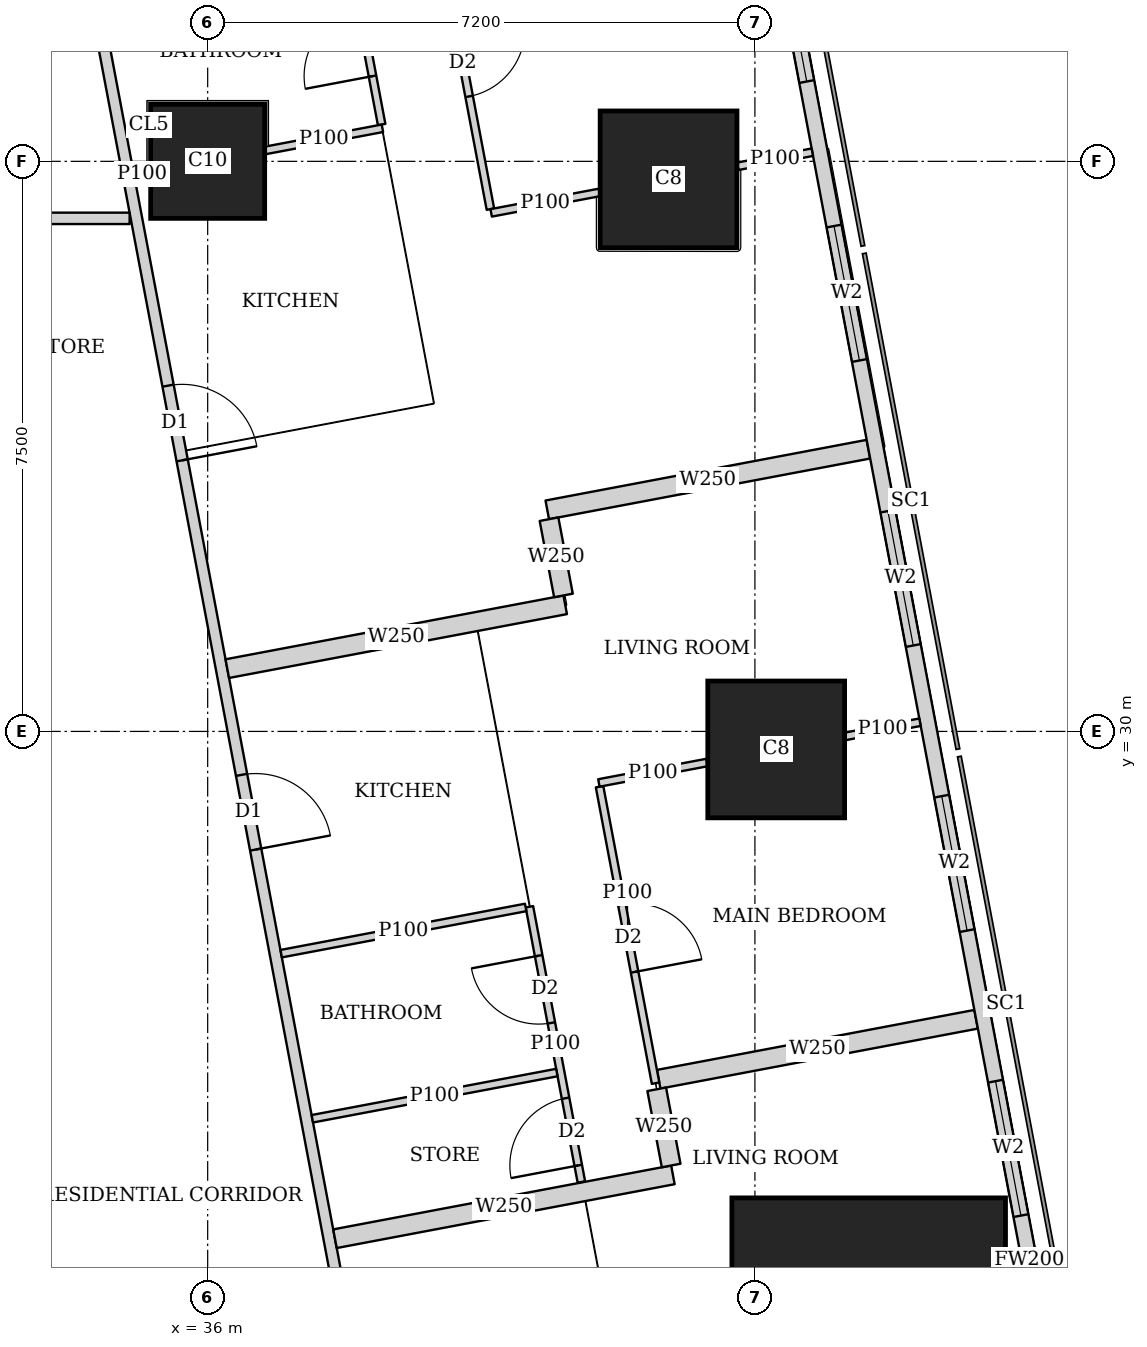
"""IFC4 building model, lengths in metres.
Left out: names, types, materials, properties, quantities, classifications, styles, units other than length and angle.
Written with IfcOpenShell. Run it as: python <this file> out.ifc"""

import sys

from ifc_helpers import new_model, si_unit, direction, frame, frame_2d, origin, origin_2d, place, context, subcontext, project, spatial, rectangle, extrude, element, fill, save


model = new_model("IFC4")
c1 = context("Model", 3, precision=1e-05, world=origin(), true_north=direction((0.0, 1.0)))
c2 = subcontext(c1, "Body", "Model", "MODEL_VIEW")
j1 = project(units=[si_unit("LENGTHUNIT", "METRE"), si_unit("PLANEANGLEUNIT", "RADIAN")], contexts=[c1])
p1 = place(None, origin())
s1 = spatial("IfcSite", under=j1, at=p1, CompositionType="ELEMENT")
p2 = place(p1, origin())
s2 = spatial("IfcBuilding", under=s1, at=p2, CompositionType="ELEMENT")
p3 = place(p2, frame((0.0, 0.0, 169.55)))
s3 = spatial("IfcBuildingStorey", under=s2, at=p3, CompositionType="ELEMENT", Elevation=169.55)
p4 = place(p3, frame((44.697, 22.263, 0.0), z_axis=(0.0, 0.0, 1.0), x_axis=(1.0, 0.0, 0.0)))
e1 = element("IfcColumn", 1, at=p4, inside=s3, PredefinedType="COLUMN", context=c2, shape_type="SweptSolid", body=[
    extrude(rectangle(XDim=3.6, YDim=3.2, at=origin_2d()), origin(), (0.0, 0.0, 1.0), 3.75),
])
p5 = place(p3, frame((43.48, 29.763, 0.0), z_axis=(0.0, 0.0, 1.0), x_axis=(1.0, 0.0, 0.0)))
e2 = element("IfcColumn", 2, at=p5, inside=s3, PredefinedType="COLUMN", context=c2, shape_type="SweptSolid", body=[
    extrude(rectangle(XDim=1.8, YDim=1.8, at=origin_2d()), origin(), (0.0, 0.0, 1.0), 3.75),
])
p6 = place(p3, frame((36.0, 37.5, 0.0), z_axis=(0.0, 0.0, 1.0), x_axis=(1.0, 0.0, 0.0)))
e3 = element("IfcColumn", 3, at=p6, inside=s3, PredefinedType="COLUMN", context=c2, shape_type="SweptSolid", body=[
    extrude(rectangle(XDim=1.5, YDim=1.5, at=origin_2d()), origin(), (0.0, 0.0, 1.0), 3.75),
])
p7 = place(p3, frame((42.064, 37.263, 0.0), z_axis=(0.0, 0.0, 1.0), x_axis=(1.0, 0.0, 0.0)))
e4 = element("IfcColumn", 4, at=p7, inside=s3, PredefinedType="COLUMN", context=c2, shape_type="SweptSolid", body=[
    extrude(rectangle(XDim=1.8, YDim=1.8, at=origin_2d()), origin(), (0.0, 0.0, 1.0), 3.75),
])
p8 = place(p3, frame((50.653, 2.703, 0.0), z_axis=(0.0, 0.0, 1.0), x_axis=(-0.185612026696, 0.982623109613, 0.0)))
e5 = element("IfcWall", 5, at=p8, inside=s3, PredefinedType="SOLIDWALL", context=c2, shape_type="SweptSolid", body=[
    extrude(rectangle(XDim=41.393, YDim=0.2, at=frame_2d((20.697, 0.0))), origin(), (0.0, 0.0, 1.0), 3.5),
])
p9 = place(p8, frame((1.633, 0.0, 0.9)))
e6 = element("IfcOpeningElement", 6, at=p9, cuts=e5, PredefinedType="OPENING", context=c2, shape_type="SweptSolid", body=[
    extrude(rectangle(XDim=1.8, YDim=1.5, at=frame_2d((0.9, 0.75))), frame((0.0, 0.11, 0.0), z_axis=(0.0, -1.0, 0.0), x_axis=(1.0, 0.0, 0.0)), (0.0, 0.0, 1.0), 0.22),
])
p10 = place(p8, frame((6.032, 0.0, 0.9)))
e7 = element("IfcOpeningElement", 7, at=p10, cuts=e5, PredefinedType="OPENING", context=c2, shape_type="SweptSolid", body=[
    extrude(rectangle(XDim=1.8, YDim=1.5, at=frame_2d((0.9, 0.75))), frame((0.0, 0.11, 0.0), z_axis=(0.0, -1.0, 0.0), x_axis=(1.0, 0.0, 0.0)), (0.0, 0.0, 1.0), 0.22),
])
p11 = place(p8, frame((9.848, 0.0, 0.9)))
e8 = element("IfcOpeningElement", 8, at=p11, cuts=e5, PredefinedType="OPENING", context=c2, shape_type="SweptSolid", body=[
    extrude(rectangle(XDim=1.8, YDim=1.5, at=frame_2d((0.9, 0.75))), frame((0.0, 0.11, 0.0), z_axis=(0.0, -1.0, 0.0), x_axis=(1.0, 0.0, 0.0)), (0.0, 0.0, 1.0), 0.22),
])
p12 = place(p8, frame((13.664, 0.0, 0.9)))
e9 = element("IfcOpeningElement", 9, at=p12, cuts=e5, PredefinedType="OPENING", context=c2, shape_type="SweptSolid", body=[
    extrude(rectangle(XDim=1.8, YDim=1.5, at=frame_2d((0.9, 0.75))), frame((0.0, 0.11, 0.0), z_axis=(0.0, -1.0, 0.0), x_axis=(1.0, 0.0, 0.0)), (0.0, 0.0, 1.0), 0.22),
])
p13 = place(p8, frame((17.481, 0.0, 0.9)))
e10 = element("IfcOpeningElement", 10, at=p13, cuts=e5, PredefinedType="OPENING", context=c2, shape_type="SweptSolid", body=[
    extrude(rectangle(XDim=1.8, YDim=1.5, at=frame_2d((0.9, 0.75))), frame((0.0, 0.11, 0.0), z_axis=(0.0, -1.0, 0.0), x_axis=(1.0, 0.0, 0.0)), (0.0, 0.0, 1.0), 0.22),
])
p14 = place(p8, frame((21.297, 0.0, 0.9)))
e11 = element("IfcOpeningElement", 11, at=p14, cuts=e5, PredefinedType="OPENING", context=c2, shape_type="SweptSolid", body=[
    extrude(rectangle(XDim=1.8, YDim=1.5, at=frame_2d((0.9, 0.75))), frame((0.0, 0.11, 0.0), z_axis=(0.0, -1.0, 0.0), x_axis=(1.0, 0.0, 0.0)), (0.0, 0.0, 1.0), 0.22),
])
p15 = place(p8, frame((25.113, 0.0, 0.9)))
e12 = element("IfcOpeningElement", 12, at=p15, cuts=e5, PredefinedType="OPENING", context=c2, shape_type="SweptSolid", body=[
    extrude(rectangle(XDim=1.8, YDim=1.5, at=frame_2d((0.9, 0.75))), frame((0.0, 0.11, 0.0), z_axis=(0.0, -1.0, 0.0), x_axis=(1.0, 0.0, 0.0)), (0.0, 0.0, 1.0), 0.22),
])
p16 = place(p8, frame((28.93, 0.0, 0.9)))
e13 = element("IfcOpeningElement", 13, at=p16, cuts=e5, PredefinedType="OPENING", context=c2, shape_type="SweptSolid", body=[
    extrude(rectangle(XDim=1.8, YDim=1.5, at=frame_2d((0.9, 0.75))), frame((0.0, 0.11, 0.0), z_axis=(0.0, -1.0, 0.0), x_axis=(1.0, 0.0, 0.0)), (0.0, 0.0, 1.0), 0.22),
])
p17 = place(p8, frame((32.746, 0.0, 0.9)))
e14 = element("IfcOpeningElement", 14, at=p17, cuts=e5, PredefinedType="OPENING", context=c2, shape_type="SweptSolid", body=[
    extrude(rectangle(XDim=1.8, YDim=1.5, at=frame_2d((0.9, 0.75))), frame((0.0, 0.11, 0.0), z_axis=(0.0, -1.0, 0.0), x_axis=(1.0, 0.0, 0.0)), (0.0, 0.0, 1.0), 0.22),
])
p18 = place(p8, frame((36.481, 0.0, 0.9)))
e15 = element("IfcOpeningElement", 15, at=p18, cuts=e5, PredefinedType="OPENING", context=c2, shape_type="SweptSolid", body=[
    extrude(rectangle(XDim=1.8, YDim=1.5, at=frame_2d((0.9, 0.75))), frame((0.0, 0.11, 0.0), z_axis=(0.0, -1.0, 0.0), x_axis=(1.0, 0.0, 0.0)), (0.0, 0.0, 1.0), 0.22),
])
p19 = place(p3, frame((29.551, 36.75, 0.0), z_axis=(0.0, 0.0, 1.0), x_axis=(1.0, 0.0, 0.0)))
e16 = element("IfcWall", 16, at=p19, inside=s3, PredefinedType="SOLIDWALL", context=c2, shape_type="SweptSolid", body=[
    extrude(rectangle(XDim=5.422, YDim=0.15, at=frame_2d((2.711, 0.0))), origin(), (0.0, 0.0, 1.0), 3.5),
])
p20 = place(p19, frame((2.895, 0.0, 0.0)))
e17 = element("IfcOpeningElement", 17, at=p20, cuts=e16, PredefinedType="OPENING", context=c2, shape_type="SweptSolid", body=[
    extrude(rectangle(XDim=1.0, YDim=2.1, at=frame_2d((0.5, 1.05))), frame((0.0, 0.085, 0.0), z_axis=(0.0, -1.0, 0.0), x_axis=(1.0, 0.0, 0.0)), (0.0, 0.0, 1.0), 0.17),
])
p21 = place(p3, frame((33.877, 43.029, 0.0), z_axis=(0.0, 0.0, 1.0), x_axis=(0.185596841028, -0.98262597798, 0.0)))
e18 = element("IfcWall", 18, at=p21, inside=s3, PredefinedType="SOLIDWALL", context=c2, shape_type="SweptSolid", body=[
    extrude(rectangle(XDim=41.66, YDim=0.15, at=frame_2d((20.83, 0.0))), origin(), (0.0, 0.0, 1.0), 2.5),
])
p22 = place(p21, frame((8.63, 0.0, 0.0)))
e19 = element("IfcOpeningElement", 19, at=p22, cuts=e18, PredefinedType="OPENING", context=c2, shape_type="SweptSolid", body=[
    extrude(rectangle(XDim=1.0, YDim=2.1, at=frame_2d((0.5, 1.05))), frame((0.0, 0.085, 0.0), z_axis=(0.0, -1.0, 0.0), x_axis=(1.0, 0.0, 0.0)), (0.0, 0.0, 1.0), 0.17),
])
p23 = place(p21, frame((13.841, 0.0, 0.0)))
e20 = element("IfcOpeningElement", 20, at=p23, cuts=e18, PredefinedType="OPENING", context=c2, shape_type="SweptSolid", body=[
    extrude(rectangle(XDim=1.0, YDim=2.1, at=frame_2d((0.5, 1.05))), frame((0.0, 0.085, 0.0), z_axis=(0.0, -1.0, 0.0), x_axis=(1.0, 0.0, 0.0)), (0.0, 0.0, 1.0), 0.17),
])
p24 = place(p21, frame((21.474, 0.0, 0.0)))
e21 = element("IfcOpeningElement", 21, at=p24, cuts=e18, PredefinedType="OPENING", context=c2, shape_type="SweptSolid", body=[
    extrude(rectangle(XDim=1.0, YDim=2.1, at=frame_2d((0.5, 1.05))), frame((0.0, 0.085, 0.0), z_axis=(0.0, -1.0, 0.0), x_axis=(1.0, 0.0, 0.0)), (0.0, 0.0, 1.0), 0.17),
])
p25 = place(p21, frame((30.4, 0.0, 0.0)))
e22 = element("IfcOpeningElement", 22, at=p25, cuts=e18, PredefinedType="OPENING", context=c2, shape_type="SweptSolid", body=[
    extrude(rectangle(XDim=1.0, YDim=2.1, at=frame_2d((0.5, 1.05))), frame((0.0, 0.085, 0.0), z_axis=(0.0, -1.0, 0.0), x_axis=(1.0, 0.0, 0.0)), (0.0, 0.0, 1.0), 0.17),
])
p26 = place(p21, frame((32.288, 0.0, 0.0)))
e23 = element("IfcOpeningElement", 23, at=p26, cuts=e18, PredefinedType="OPENING", context=c2, shape_type="SweptSolid", body=[
    extrude(rectangle(XDim=1.0, YDim=2.1, at=frame_2d((0.5, 1.05))), frame((0.0, 0.085, 0.0), z_axis=(0.0, -1.0, 0.0), x_axis=(1.0, 0.0, 0.0)), (0.0, 0.0, 1.0), 0.17),
])
p27 = place(p3, frame((38.701, 42.27, 0.0), z_axis=(0.0, 0.0, 1.0), x_axis=(0.185474244877, -0.982649125826, 0.0)))
e24 = element("IfcWall", 24, at=p27, inside=s3, PredefinedType="PARTITIONING", context=c2, shape_type="SweptSolid", body=[
    extrude(rectangle(XDim=5.494, YDim=0.1, at=frame_2d((2.747, 0.0))), origin(), (0.0, 0.0, 1.0), 3.5),
])
p28 = place(p27, frame((3.085, 0.0, 0.0)))
e25 = element("IfcOpeningElement", 25, at=p28, cuts=e24, PredefinedType="OPENING", context=c2, shape_type="SweptSolid", body=[
    extrude(rectangle(XDim=0.9, YDim=2.1, at=frame_2d((0.45, 1.05))), frame((0.0, 0.06, 0.0), z_axis=(0.0, -1.0, 0.0), x_axis=(1.0, 0.0, 0.0)), (0.0, 0.0, 1.0), 0.12),
])
p29 = place(p3, frame((37.41, 42.639, 0.0), z_axis=(0.0, 0.0, 1.0), x_axis=(0.185579683022, -0.982629218601, 0.0)))
e26 = element("IfcWall", 26, at=p29, inside=s3, PredefinedType="PARTITIONING", context=c2, shape_type="SweptSolid", body=[
    extrude(rectangle(XDim=4.737, YDim=0.1, at=frame_2d((2.369, 0.0))), origin(), (0.0, 0.0, 1.0), 3.5),
])
p30 = place(p29, frame((3.189, 0.0, 0.0)))
e27 = element("IfcOpeningElement", 27, at=p30, cuts=e26, PredefinedType="OPENING", context=c2, shape_type="SweptSolid", body=[
    extrude(rectangle(XDim=0.9, YDim=2.1, at=frame_2d((0.45, 1.05))), frame((0.0, 0.06, 0.0), z_axis=(0.0, -1.0, 0.0), x_axis=(1.0, 0.0, 0.0)), (0.0, 0.0, 1.0), 0.12),
])
p31 = place(p29, frame((1.131, 0.0, 0.0)))
e28 = element("IfcOpeningElement", 28, at=p31, cuts=e26, PredefinedType="OPENING", context=c2, shape_type="SweptSolid", body=[
    extrude(rectangle(XDim=0.9, YDim=2.1, at=frame_2d((0.45, 1.05))), frame((0.0, 0.06, 0.0), z_axis=(0.0, -1.0, 0.0), x_axis=(1.0, 0.0, 0.0)), (0.0, 0.0, 1.0), 0.12),
])
p32 = place(p3, frame((43.955, 37.62, 0.0), z_axis=(0.0, 0.0, 1.0), x_axis=(-0.982666697719, -0.185381124159, 0.0)))
e29 = element("IfcWall", 29, at=p32, inside=s3, PredefinedType="PARTITIONING", context=c2, shape_type="SweptSolid", body=[
    extrude(rectangle(XDim=0.998, YDim=0.1, at=frame_2d((0.499, 0.0))), origin(), (0.0, 0.0, 1.0), 3.5),
])
p33 = place(p3, frame((41.154, 37.091, 0.0), z_axis=(0.0, 0.0, 1.0), x_axis=(-0.982617614942, -0.185641112921, 0.0)))
e30 = element("IfcWall", 30, at=p33, inside=s3, PredefinedType="PARTITIONING", context=c2, shape_type="SweptSolid", body=[
    extrude(rectangle(XDim=1.449, YDim=0.1, at=frame_2d((0.725, 0.0))), origin(), (0.0, 0.0, 1.0), 3.5),
])
p34 = place(p3, frame((38.299, 37.935, 0.0), z_axis=(0.0, 0.0, 1.0), x_axis=(-0.98258870752, -0.18579405764, 0.0)))
e31 = element("IfcWall", 31, at=p34, inside=s3, PredefinedType="PARTITIONING", context=c2, shape_type="SweptSolid", body=[
    extrude(rectangle(XDim=1.566, YDim=0.1, at=frame_2d((0.783, 0.0))), origin(), (0.0, 0.0, 1.0), 3.5),
])
p35 = place(p3, frame((35.24, 37.356, 0.0), z_axis=(0.0, 0.0, 1.0), x_axis=(-0.982819911474, -0.184567119526, 0.0)))
e32 = element("IfcWall", 32, at=p35, inside=s3, PredefinedType="PARTITIONING", context=c2, shape_type="SweptSolid", body=[
    extrude(rectangle(XDim=0.212, YDim=0.1, at=frame_2d((0.106, 0.0))), origin(), (0.0, 0.0, 1.0), 3.5),
])
p36 = place(p3, frame((41.156, 29.273, 0.0), z_axis=(0.0, 0.0, 1.0), x_axis=(0.185662195158, -0.982613631744, 0.0)))
e33 = element("IfcWall", 33, at=p36, inside=s3, PredefinedType="PARTITIONING", context=c2, shape_type="SweptSolid", body=[
    extrude(rectangle(XDim=3.97, YDim=0.1, at=frame_2d((1.985, 0.0))), origin(), (0.0, 0.0, 1.0), 2.5),
])
p37 = place(p36, frame((1.581, 0.0, 0.0)))
e34 = element("IfcOpeningElement", 34, at=p37, cuts=e33, PredefinedType="OPENING", context=c2, shape_type="SweptSolid", body=[
    extrude(rectangle(XDim=0.9, YDim=2.1, at=frame_2d((0.45, 1.05))), frame((0.0, 0.06, 0.0), z_axis=(0.0, -1.0, 0.0), x_axis=(1.0, 0.0, 0.0)), (0.0, 0.0, 1.0), 0.12),
])
p38 = place(p3, frame((40.233, 27.693, 0.0), z_axis=(0.0, 0.0, 1.0), x_axis=(0.185632361754, -0.982619268216, 0.0)))
e35 = element("IfcWall", 35, at=p38, inside=s3, PredefinedType="PARTITIONING", context=c2, shape_type="SweptSolid", body=[
    extrude(rectangle(XDim=3.685, YDim=0.1, at=frame_2d((1.843, 0.0))), origin(), (0.0, 0.0, 1.0), 3.5),
])
p39 = place(p38, frame((0.655, 0.0, 0.0)))
e36 = element("IfcOpeningElement", 36, at=p39, cuts=e35, PredefinedType="OPENING", context=c2, shape_type="SweptSolid", body=[
    extrude(rectangle(XDim=0.9, YDim=2.1, at=frame_2d((0.45, 1.05))), frame((0.0, 0.06, 0.0), z_axis=(0.0, -1.0, 0.0), x_axis=(1.0, 0.0, 0.0)), (0.0, 0.0, 1.0), 0.12),
])
p40 = place(p38, frame((2.563, 0.0, 0.0)))
e37 = element("IfcOpeningElement", 37, at=p40, cuts=e35, PredefinedType="OPENING", context=c2, shape_type="SweptSolid", body=[
    extrude(rectangle(XDim=0.9, YDim=2.1, at=frame_2d((0.45, 1.05))), frame((0.0, 0.06, 0.0), z_axis=(0.0, -1.0, 0.0), x_axis=(1.0, 0.0, 0.0)), (0.0, 0.0, 1.0), 0.12),
])
p41 = place(p3, frame((45.372, 30.121, 0.0), z_axis=(0.0, 0.0, 1.0), x_axis=(-0.982530437059, -0.186101961978, 0.0)))
e38 = element("IfcWall", 38, at=p41, inside=s3, PredefinedType="PARTITIONING", context=c2, shape_type="SweptSolid", body=[
    extrude(rectangle(XDim=1.0, YDim=0.1, at=frame_2d((0.5, 0.0))), origin(), (0.0, 0.0, 1.0), 3.5),
])
p42 = place(p3, frame((42.57, 29.591, 0.0), z_axis=(0.0, 0.0, 1.0), x_axis=(-0.98259436979, -0.185764109712, 0.0)))
e39 = element("IfcWall", 39, at=p42, inside=s3, PredefinedType="PARTITIONING", context=c2, shape_type="SweptSolid", body=[
    extrude(rectangle(XDim=1.448, YDim=0.1, at=frame_2d((0.724, 0.0))), origin(), (0.0, 0.0, 1.0), 2.5),
])
for number, where, z_axis, x_axis in (
    (40, (40.184, 27.684, 0.0), (0.0, 0.0, 1.0), (-0.983, -0.186, 0.0)),
    (41, (40.594, 25.512, 0.0), (0.0, 0.0, 1.0), (-0.983, -0.186, 0.0)),
):
    element("IfcWall", number, at=place(p3, frame(where, z_axis=z_axis, x_axis=x_axis)), inside=s3, PredefinedType="PARTITIONING", context=c2, shape_type="SweptSolid", body=[
        extrude(rectangle(XDim=3.274, YDim=0.1, at=frame_2d((1.637, 0.0))), origin(), (0.0, 0.0, 1.0), 3.5),
    ])
p43 = place(p3, frame((44.693, 33.713, 0.0), z_axis=(0.0, 0.0, 1.0), x_axis=(-0.982633535512, -0.185556823879, 0.0)))
e42 = element("IfcWall", 42, at=p43, inside=s3, PredefinedType="SOLIDWALL", context=c2, shape_type="SweptSolid", body=[
    extrude(rectangle(XDim=4.3, YDim=0.25, at=frame_2d((2.15, 0.0))), origin(), (0.0, 0.0, 1.0), 2.1),
])
p44 = place(p3, frame((40.704, 31.666, 0.0), z_axis=(0.0, 0.0, 1.0), x_axis=(-0.982612837616, -0.185666398014, 0.0)))
e43 = element("IfcWall", 43, at=p44, inside=s3, PredefinedType="SOLIDWALL", context=c2, shape_type="SweptSolid", body=[
    extrude(rectangle(XDim=4.525, YDim=0.25, at=frame_2d((2.262, 0.0))), origin(), (0.0, 0.0, 1.0), 3.5),
])
p45 = place(p3, frame((40.491, 32.792, 0.0), z_axis=(0.0, 0.0, 1.0), x_axis=(0.18607888991, -0.982534806879, 0.0)))
e44 = element("IfcWall", 44, at=p45, inside=s3, PredefinedType="SOLIDWALL", context=c2, shape_type="SweptSolid", body=[
    extrude(rectangle(XDim=1.021, YDim=0.25, at=frame_2d((0.51, 0.0))), origin(), (0.0, 0.0, 1.0), 3.5),
])
p46 = place(p3, frame((46.11, 26.213, 0.0), z_axis=(0.0, 0.0, 1.0), x_axis=(-0.982623519589, -0.185609856287, 0.0)))
e45 = element("IfcWall", 45, at=p46, inside=s3, PredefinedType="SOLIDWALL", context=c2, shape_type="SweptSolid", body=[
    extrude(rectangle(XDim=4.25, YDim=0.25, at=frame_2d((2.125, 0.0))), origin(), (0.0, 0.0, 1.0), 2.1),
])
p47 = place(p3, frame((42.121, 24.166, 0.0), z_axis=(0.0, 0.0, 1.0), x_axis=(-0.982612837616, -0.185666398014, 0.0)))
e46 = element("IfcWall", 46, at=p47, inside=s3, PredefinedType="SOLIDWALL", context=c2, shape_type="SweptSolid", body=[
    extrude(rectangle(XDim=4.525, YDim=0.25, at=frame_2d((2.262, 0.0))), origin(), (0.0, 0.0, 1.0), 3.5),
])
p48 = place(p3, frame((41.908, 25.292, 0.0), z_axis=(0.0, 0.0, 1.0), x_axis=(0.18607888991, -0.982534806879, 0.0)))
e47 = element("IfcWall", 47, at=p48, inside=s3, PredefinedType="SOLIDWALL", context=c2, shape_type="SweptSolid", body=[
    extrude(rectangle(XDim=1.021, YDim=0.25, at=frame_2d((0.51, 0.0))), origin(), (0.0, 0.0, 1.0), 3.5),
])
p49 = place(p14, origin())
e48 = element("IfcWindow", 48, at=p49, inside=s3, PartitioningType="SINGLE_PANEL", PredefinedType="WINDOW", context=c2, shape_type="SweptSolid", body=[
    extrude(rectangle(XDim=1.8, YDim=1.5, at=frame_2d((0.9, 0.75))), frame((0.0, 0.03, 0.0), z_axis=(0.0, -1.0, 0.0), x_axis=(1.0, 0.0, 0.0)), (0.0, 0.0, 1.0), 0.06),
])
fill(e11, e48)
p50 = place(p15, origin())
e49 = element("IfcWindow", 49, at=p50, inside=s3, PartitioningType="SINGLE_PANEL", PredefinedType="WINDOW", context=c2, shape_type="SweptSolid", body=[
    extrude(rectangle(XDim=1.8, YDim=1.5, at=frame_2d((0.9, 0.75))), frame((0.0, 0.03, 0.0), z_axis=(0.0, -1.0, 0.0), x_axis=(1.0, 0.0, 0.0)), (0.0, 0.0, 1.0), 0.06),
])
fill(e12, e49)
p51 = place(p16, origin())
e50 = element("IfcWindow", 50, at=p51, inside=s3, PartitioningType="SINGLE_PANEL", PredefinedType="WINDOW", context=c2, shape_type="SweptSolid", body=[
    extrude(rectangle(XDim=1.8, YDim=1.5, at=frame_2d((0.9, 0.75))), frame((0.0, 0.03, 0.0), z_axis=(0.0, -1.0, 0.0), x_axis=(1.0, 0.0, 0.0)), (0.0, 0.0, 1.0), 0.06),
])
fill(e13, e50)
p52 = place(p17, origin())
e51 = element("IfcWindow", 51, at=p52, inside=s3, PartitioningType="SINGLE_PANEL", PredefinedType="WINDOW", context=c2, shape_type="SweptSolid", body=[
    extrude(rectangle(XDim=1.8, YDim=1.5, at=frame_2d((0.9, 0.75))), frame((0.0, 0.03, 0.0), z_axis=(0.0, -1.0, 0.0), x_axis=(1.0, 0.0, 0.0)), (0.0, 0.0, 1.0), 0.06),
])
fill(e14, e51)
p53 = place(p18, origin())
e52 = element("IfcWindow", 52, at=p53, inside=s3, PartitioningType="SINGLE_PANEL", PredefinedType="WINDOW", context=c2, shape_type="SweptSolid", body=[
    extrude(rectangle(XDim=1.8, YDim=1.5, at=frame_2d((0.9, 0.75))), frame((0.0, 0.03, 0.0), z_axis=(0.0, -1.0, 0.0), x_axis=(1.0, 0.0, 0.0)), (0.0, 0.0, 1.0), 0.06),
])
fill(e15, e52)
p54 = place(p28, origin())
e53 = element("IfcDoor", 53, at=p54, inside=s3, OperationType="SINGLE_SWING_LEFT", PredefinedType="DOOR", context=c2, shape_type="SweptSolid", body=[
    extrude(rectangle(XDim=0.9, YDim=2.1, at=frame_2d((0.45, 1.05))), frame((0.0, 0.025, 0.0), z_axis=(0.0, -1.0, 0.0), x_axis=(1.0, 0.0, 0.0)), (0.0, 0.0, 1.0), 0.05),
])
fill(e25, e53)
p55 = place(p30, origin())
e54 = element("IfcDoor", 54, at=p55, inside=s3, OperationType="SINGLE_SWING_LEFT", PredefinedType="DOOR", context=c2, shape_type="SweptSolid", body=[
    extrude(rectangle(XDim=0.9, YDim=2.1, at=frame_2d((0.45, 1.05))), frame((0.0, 0.025, 0.0), z_axis=(0.0, -1.0, 0.0), x_axis=(1.0, 0.0, 0.0)), (0.0, 0.0, 1.0), 0.05),
])
fill(e27, e54)
p56 = place(p22, origin())
e55 = element("IfcDoor", 55, at=p56, inside=s3, OperationType="SINGLE_SWING_RIGHT", PredefinedType="DOOR", context=c2, shape_type="SweptSolid", body=[
    extrude(rectangle(XDim=1.0, YDim=2.1, at=frame_2d((0.5, 1.05))), frame((0.0, 0.025, 0.0), z_axis=(0.0, -1.0, 0.0), x_axis=(1.0, 0.0, 0.0)), (0.0, 0.0, 1.0), 0.05),
])
fill(e19, e55)
p57 = place(p37, origin())
e56 = element("IfcDoor", 56, at=p57, inside=s3, OperationType="SINGLE_SWING_RIGHT", PredefinedType="DOOR", context=c2, shape_type="SweptSolid", body=[
    extrude(rectangle(XDim=0.9, YDim=2.1, at=frame_2d((0.45, 1.05))), frame((0.0, 0.025, 0.0), z_axis=(0.0, -1.0, 0.0), x_axis=(1.0, 0.0, 0.0)), (0.0, 0.0, 1.0), 0.05),
])
fill(e34, e56)
p58 = place(p39, origin())
e57 = element("IfcDoor", 57, at=p58, inside=s3, OperationType="SINGLE_SWING_RIGHT", PredefinedType="DOOR", context=c2, shape_type="SweptSolid", body=[
    extrude(rectangle(XDim=0.9, YDim=2.1, at=frame_2d((0.45, 1.05))), frame((0.0, 0.025, 0.0), z_axis=(0.0, -1.0, 0.0), x_axis=(1.0, 0.0, 0.0)), (0.0, 0.0, 1.0), 0.05),
])
fill(e36, e57)
p59 = place(p40, origin())
e58 = element("IfcDoor", 58, at=p59, inside=s3, OperationType="SINGLE_SWING_LEFT", PredefinedType="DOOR", context=c2, shape_type="SweptSolid", body=[
    extrude(rectangle(XDim=0.9, YDim=2.1, at=frame_2d((0.45, 1.05))), frame((0.0, 0.025, 0.0), z_axis=(0.0, -1.0, 0.0), x_axis=(1.0, 0.0, 0.0)), (0.0, 0.0, 1.0), 0.05),
])
fill(e37, e58)
p60 = place(p23, origin())
e59 = element("IfcDoor", 59, at=p60, inside=s3, OperationType="SINGLE_SWING_RIGHT", PredefinedType="DOOR", context=c2, shape_type="SweptSolid", body=[
    extrude(rectangle(XDim=1.0, YDim=2.1, at=frame_2d((0.5, 1.05))), frame((0.0, 0.025, 0.0), z_axis=(0.0, -1.0, 0.0), x_axis=(1.0, 0.0, 0.0)), (0.0, 0.0, 1.0), 0.05),
])
fill(e20, e59)
save(model, sys.argv[1])
